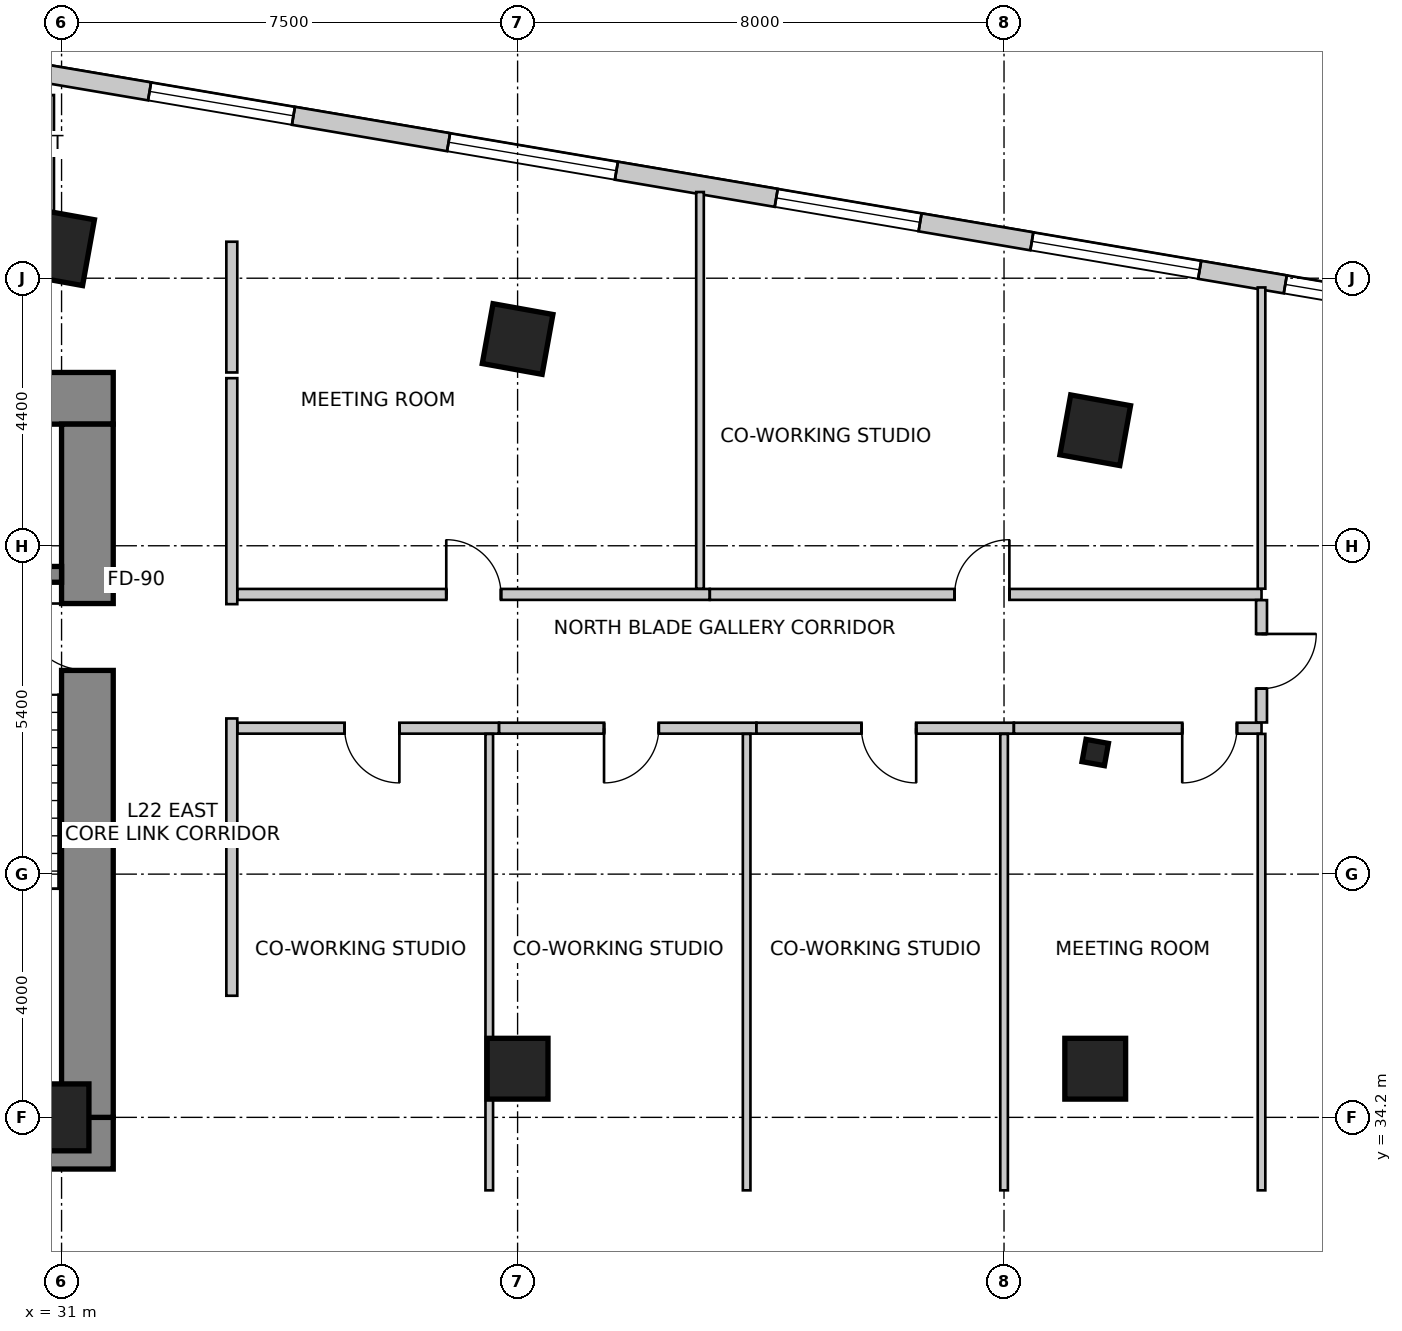
"""IFC4 building model, lengths in metres.
Left out: names, types, materials, properties, quantities, classifications, styles, units other than length and angle.
Written with IfcOpenShell. Run it as: python <this file> out.ifc"""

import sys

from ifc_helpers import new_model, si_unit, direction, frame, frame_2d, origin, origin_2d, place, context, subcontext, project, spatial, rectangle, i_section, extrude, source, transform, mapped, element, fill, save


model = new_model("IFC4")
c1 = context("Model", 3, precision=1e-05, world=origin(), true_north=direction((0.0, 1.0)))
c2 = subcontext(c1, "Body", "Model", "MODEL_VIEW")
j1 = project(units=[si_unit("LENGTHUNIT", "METRE"), si_unit("PLANEANGLEUNIT", "RADIAN")], contexts=[c1])
p1 = place(None, origin())
s1 = spatial("IfcSite", under=j1, at=p1, CompositionType="ELEMENT")
p2 = place(p1, origin())
s2 = spatial("IfcBuilding", under=s1, at=p2, CompositionType="ELEMENT")
p3 = place(p2, frame((0.0, 0.0, 91.0)))
s3 = spatial("IfcBuildingStorey", under=s2, at=p3, CompositionType="ELEMENT", Elevation=91.0)
p4 = place(p3, frame((15.75, 46.025, 0.0), z_axis=(0.0, 0.0, 1.0), x_axis=(1.0, 0.0, 0.0)))
e1 = element("IfcWall", 1, at=p4, inside=s3, PredefinedType="SHEAR", context=c2, shape_type="SweptSolid", body=[
    extrude(rectangle(XDim=16.1, YDim=0.85, at=frame_2d((8.05, 0.0))), origin(), (0.0, 0.0, 1.0), 4.0),
])
p5 = place(p3, frame((15.75, 33.775, 0.0), z_axis=(0.0, 0.0, 1.0), x_axis=(1.0, 0.0, 0.0)))
e2 = element("IfcWall", 2, at=p5, inside=s3, PredefinedType="SHEAR", context=c2, shape_type="SweptSolid", body=[
    extrude(rectangle(XDim=16.1, YDim=0.85, at=frame_2d((8.05, 0.0))), origin(), (0.0, 0.0, 1.0), 4.0),
])
m1 = source(origin(), c2, "Body", "SweptSolid", [
    extrude(rectangle(XDim=1.3, YDim=2.15, at=frame_2d((0.65, 1.075))), frame((0.0, 0.435, 0.0), z_axis=(0.0, -1.0, 0.0), x_axis=(1.0, 0.0, 0.0)), (0.0, 0.0, 1.0), 0.87),
])
p6 = place(p5, frame((10.18, 0.0, 0.0)))
e3 = element("IfcOpeningElement", 3, at=p6, cuts=e2, PredefinedType="OPENING", context=c2, shape_type="MappedRepresentation", body=[
    mapped(m1, transform((0.0, 0.0, 0.0), scale=1.0)),
])
p7 = place(p3, frame((31.425, 34.2, 0.0), z_axis=(0.0, 0.0, 1.0), x_axis=(0.0, 1.0, 0.0)))
e4 = element("IfcWall", 4, at=p7, inside=s3, PredefinedType="SHEAR", context=c2, shape_type="SweptSolid", body=[
    extrude(rectangle(XDim=11.4, YDim=0.85, at=frame_2d((5.7, 0.0))), origin(), (0.0, 0.0, 1.0), 4.0),
])
m2 = source(origin(), c2, "Body", "SweptSolid", [
    extrude(rectangle(XDim=1.1, YDim=2.15, at=frame_2d((0.55, 1.075))), frame((0.0, 0.435, 0.0), z_axis=(0.0, -1.0, 0.0), x_axis=(1.0, 0.0, 0.0)), (0.0, 0.0, 1.0), 0.87),
])
p8 = place(p7, frame((7.35, 0.0, 0.0)))
e5 = element("IfcOpeningElement", 5, at=p8, cuts=e4, PredefinedType="OPENING", context=c2, shape_type="MappedRepresentation", body=[
    mapped(m2, transform((0.0, 0.0, 0.0), scale=1.0)),
])
p9 = place(p3, frame((27.5, 43.13, 0.0), z_axis=(0.0, 0.0, 1.0), x_axis=(1.0, 0.0, 0.0)))
e6 = element("IfcWall", 6, at=p9, inside=s3, PredefinedType="SHEAR", context=c2, shape_type="SweptSolid", body=[
    extrude(rectangle(XDim=3.5, YDim=0.26, at=frame_2d((1.75, 0.0))), origin(), (0.0, 0.0, 1.0), 4.0),
])
m3 = source(origin(), c2, "Body", "SweptSolid", [
    extrude(rectangle(XDim=0.9, YDim=1.1, at=origin_2d()), origin(), (0.0, 0.0, 1.0), 4.0),
])
p10 = place(p3, frame((31.0, 48.5, 0.0), z_axis=(0.0, 0.0, 1.0), x_axis=(0.984195607969, -0.17708474032, 0.0)))
e7 = element("IfcColumn", 7, at=p10, inside=s3, PredefinedType="COLUMN", context=c2, shape_type="MappedRepresentation", body=[
    mapped(m3, transform((0.0, 0.0, 0.0), scale=1.0)),
])
m4 = source(origin(), c2, "Body", "SweptSolid", [
    extrude(rectangle(XDim=1.0, YDim=1.0, at=origin_2d()), origin(), (0.0, 0.0, 1.0), 4.0),
])
for number, where, z_axis, x_axis in (
    (8, (38.5, 47.0, 0.0), (0.0, 0.0, 1.0), (0.984, -0.177, 0.0)),
    (9, (48.0, 45.5, 0.0), (0.0, 0.0, 1.0), (0.984, -0.177, 0.0)),
):
    element("IfcColumn", number, at=place(p3, frame(where, z_axis=z_axis, x_axis=x_axis)), inside=s3, PredefinedType="COLUMN", context=c2, shape_type="MappedRepresentation", body=[
        mapped(m4, transform((0.0, 0.0, 0.0), scale=1.0)),
    ])
p11 = place(p3, frame((31.0, 34.2, 0.0), z_axis=(0.0, 0.0, 1.0), x_axis=(1.0, 0.0, 0.0)))
e10 = element("IfcColumn", 10, at=p11, inside=s3, PredefinedType="COLUMN", context=c2, shape_type="MappedRepresentation", body=[
    mapped(m3, transform((0.0, 0.0, 0.0), scale=1.0)),
])
for number, where, z_axis, x_axis in (
    (11, (38.5, 35.0, 0.0), (0.0, 0.0, 1.0), (1.0, 0.0, 0.0)),
    (12, (48.0, 35.0, 0.0), (0.0, 0.0, 1.0), (1.0, 0.0, 0.0)),
):
    element("IfcColumn", number, at=place(p3, frame(where, z_axis=z_axis, x_axis=x_axis)), inside=s3, PredefinedType="COLUMN", context=c2, shape_type="MappedRepresentation", body=[
        mapped(m4, transform((0.0, 0.0, 0.0), scale=1.0)),
    ])
m5 = source(origin(), c2, "Body", "SweptSolid", [
    extrude(i_section(OverallWidth=0.374, OverallDepth=0.372, WebThickness=0.016, FlangeThickness=0.026, FilletRadius=0.015, at=origin_2d()), origin(), (0.0, 0.0, 1.0), 4.0),
])
p12 = place(p3, frame((48.0, 40.2, 0.0), z_axis=(0.0, 0.0, 1.0), x_axis=(0.984195607969, -0.17708474032, 0.0)))
e13 = element("IfcColumn", 13, at=p12, inside=s3, PredefinedType="COLUMN", context=c2, shape_type="MappedRepresentation", body=[
    mapped(m5, transform((0.0, 0.0, 0.0), scale=1.0)),
])
p13 = place(p3, frame((53.961, 47.417, 0.0), z_axis=(0.0, 0.0, 1.0), x_axis=(-0.985865713455, 0.167537443678, 0.0)))
e14 = element("IfcWall", 14, at=p13, inside=s3, PredefinedType="SOLIDWALL", context=c2, shape_type="SweptSolid", body=[
    extrude(rectangle(XDim=32.537, YDim=0.3, at=frame_2d((16.269, 0.0))), origin(), (0.0, 0.0, 1.0), 3.75),
])
m6 = source(origin(), c2, "Body", "SweptSolid", [
    extrude(rectangle(XDim=2.4, YDim=2.2, at=frame_2d((1.2, 1.1))), frame((0.0, 0.16, 0.0), z_axis=(0.0, -1.0, 0.0), x_axis=(1.0, 0.0, 0.0)), (0.0, 0.0, 1.0), 0.32),
])
p14 = place(p13, frame((0.476, 0.0, 0.85)))
e15 = element("IfcOpeningElement", 15, at=p14, cuts=e14, PredefinedType="OPENING", context=c2, shape_type="MappedRepresentation", body=[
    mapped(m6, transform((0.0, 0.0, 0.0), scale=1.0)),
])
m7 = source(origin(), c2, "Body", "SweptSolid", [
    extrude(rectangle(XDim=2.8, YDim=2.4, at=frame_2d((1.4, 1.2))), frame((0.0, 0.16, 0.0), z_axis=(0.0, -1.0, 0.0), x_axis=(1.0, 0.0, 0.0)), (0.0, 0.0, 1.0), 0.32),
])
p15 = place(p13, frame((4.304, 0.0, 0.85)))
e16 = element("IfcOpeningElement", 16, at=p15, cuts=e14, PredefinedType="OPENING", context=c2, shape_type="MappedRepresentation", body=[
    mapped(m7, transform((0.0, 0.0, 0.0), scale=1.0)),
])
p16 = place(p13, frame((8.968, 0.0, 0.85)))
e17 = element("IfcOpeningElement", 17, at=p16, cuts=e14, PredefinedType="OPENING", context=c2, shape_type="MappedRepresentation", body=[
    mapped(m6, transform((0.0, 0.0, 0.0), scale=1.0)),
])
p17 = place(p13, frame((14.034, 0.0, 0.85)))
e18 = element("IfcOpeningElement", 18, at=p17, cuts=e14, PredefinedType="OPENING", context=c2, shape_type="MappedRepresentation", body=[
    mapped(m7, transform((0.0, 0.0, 0.0), scale=1.0)),
])
p18 = place(p13, frame((19.422, 0.0, 0.85)))
e19 = element("IfcOpeningElement", 19, at=p18, cuts=e14, PredefinedType="OPENING", context=c2, shape_type="MappedRepresentation", body=[
    mapped(m6, transform((0.0, 0.0, 0.0), scale=1.0)),
])
p19 = place(p13, frame((24.895, 0.0, 0.85)))
e20 = element("IfcOpeningElement", 20, at=p19, cuts=e14, PredefinedType="OPENING", context=c2, shape_type="MappedRepresentation", body=[
    mapped(m7, transform((0.0, 0.0, 0.0), scale=1.0)),
])
p20 = place(p13, frame((29.395, 0.0, 0.85)))
e21 = element("IfcOpeningElement", 21, at=p20, cuts=e14, PredefinedType="OPENING", context=c2, shape_type="MappedRepresentation", body=[
    mapped(m7, transform((0.0, 0.0, 0.0), scale=1.0)),
])
p21 = place(p3, frame((25.362, 48.6, 0.0), z_axis=(0.0, 0.0, 1.0), x_axis=(1.0, 0.0, 0.0)))
e22 = element("IfcWall", 22, at=p21, inside=s3, PredefinedType="PARTITIONING", context=c2, shape_type="SweptSolid", body=[
    extrude(rectangle(XDim=5.598, YDim=0.18, at=frame_2d((2.799, 0.0))), origin(), (0.0, 0.0, 1.0), 2.892),
])
m8 = source(origin(), c2, "Body", "SweptSolid", [
    extrude(rectangle(XDim=0.9, YDim=2.15, at=frame_2d((0.45, 1.075))), frame((0.0, 0.1, 0.0), z_axis=(0.0, -1.0, 0.0), x_axis=(1.0, 0.0, 0.0)), (0.0, 0.0, 1.0), 0.2),
])
p22 = place(p21, frame((2.349, 0.0, 0.0)))
e23 = element("IfcOpeningElement", 23, at=p22, cuts=e22, PredefinedType="OPENING", context=c2, shape_type="MappedRepresentation", body=[
    mapped(m8, transform((0.0, 0.0, 0.0), scale=1.0)),
])
p23 = place(p3, frame((33.8, 48.6, 0.0), z_axis=(0.0, 0.0, 1.0), x_axis=(0.0, -1.0, 0.0)))
e24 = element("IfcWall", 24, at=p23, inside=s3, PredefinedType="PARTITIONING", context=c2, shape_type="SweptSolid", body=[
    extrude(rectangle(XDim=2.15, YDim=0.18, at=frame_2d((1.075, 0.0))), origin(), (0.0, 0.0, 1.0), 2.892),
])
p24 = place(p3, frame((33.8, 40.76, 0.0), z_axis=(0.0, 0.0, 1.0), x_axis=(0.0, -1.0, 0.0)))
e25 = element("IfcWall", 25, at=p24, inside=s3, PredefinedType="PARTITIONING", context=c2, shape_type="SweptSolid", body=[
    extrude(rectangle(XDim=4.56, YDim=0.18, at=frame_2d((2.28, 0.0))), origin(), (0.0, 0.0, 1.0), 3.75),
])
p25 = place(p3, frame((33.8, 46.356, 0.0), z_axis=(0.0, 0.0, 1.0), x_axis=(0.0, -1.0, 0.0)))
e26 = element("IfcWall", 26, at=p25, inside=s3, PredefinedType="PARTITIONING", context=c2, shape_type="SweptSolid", body=[
    extrude(rectangle(XDim=3.716, YDim=0.18, at=frame_2d((1.858, 0.0))), origin(), (0.0, 0.0, 1.0), 3.279),
])
p26 = place(p3, frame((38.194, 40.6, 0.0), z_axis=(0.0, 0.0, 1.0), x_axis=(-1.0, 0.0, 0.0)))
e27 = element("IfcWall", 27, at=p26, inside=s3, PredefinedType="PARTITIONING", context=c2, shape_type="SweptSolid", body=[
    extrude(rectangle(XDim=4.3, YDim=0.18, at=frame_2d((2.15, 0.0))), origin(), (0.0, 0.0, 1.0), 3.419),
])
p27 = place(p26, frame((1.638, 0.0, 0.0)))
e28 = element("IfcOpeningElement", 28, at=p27, cuts=e27, PredefinedType="OPENING", context=c2, shape_type="MappedRepresentation", body=[
    mapped(m8, transform((0.0, 0.0, 0.0), scale=1.0)),
])
p28 = place(p3, frame((42.427, 40.6, 0.0), z_axis=(0.0, 0.0, 1.0), x_axis=(-1.0, 0.0, 0.0)))
e29 = element("IfcWall", 29, at=p28, inside=s3, PredefinedType="PARTITIONING", context=c2, shape_type="SweptSolid", body=[
    extrude(rectangle(XDim=4.231, YDim=0.18, at=frame_2d((2.115, 0.0))), origin(), (0.0, 0.0, 1.0), 3.125),
])
p29 = place(p28, frame((1.605, 0.0, 0.0)))
e30 = element("IfcOpeningElement", 30, at=p29, cuts=e29, PredefinedType="OPENING", context=c2, shape_type="MappedRepresentation", body=[
    mapped(m8, transform((0.0, 0.0, 0.0), scale=1.0)),
])
p30 = place(p3, frame((46.661, 40.6, 0.0), z_axis=(0.0, 0.0, 1.0), x_axis=(-1.0, 0.0, 0.0)))
e31 = element("IfcWall", 31, at=p30, inside=s3, PredefinedType="PARTITIONING", context=c2, shape_type="SweptSolid", body=[
    extrude(rectangle(XDim=4.232, YDim=0.18, at=frame_2d((2.116, 0.0))), origin(), (0.0, 0.0, 1.0), 3.279),
])
p31 = place(p30, frame((1.606, 0.0, 0.0)))
e32 = element("IfcOpeningElement", 32, at=p31, cuts=e31, PredefinedType="OPENING", context=c2, shape_type="MappedRepresentation", body=[
    mapped(m8, transform((0.0, 0.0, 0.0), scale=1.0)),
])
p32 = place(p3, frame((50.735, 40.6, 0.0), z_axis=(0.0, 0.0, 1.0), x_axis=(-1.0, 0.0, 0.0)))
e33 = element("IfcWall", 33, at=p32, inside=s3, PredefinedType="PARTITIONING", context=c2, shape_type="SweptSolid", body=[
    extrude(rectangle(XDim=4.072, YDim=0.18, at=frame_2d((2.036, 0.0))), origin(), (0.0, 0.0, 1.0), 3.125),
])
p33 = place(p32, frame((0.404, 0.0, 0.0)))
e34 = element("IfcOpeningElement", 34, at=p33, cuts=e33, PredefinedType="OPENING", context=c2, shape_type="MappedRepresentation", body=[
    mapped(m8, transform((0.0, 0.0, 0.0), scale=1.0)),
])
p34 = place(p3, frame((33.894, 42.8, 0.0), z_axis=(0.0, 0.0, 1.0), x_axis=(1.0, 0.0, 0.0)))
e35 = element("IfcWall", 35, at=p34, inside=s3, PredefinedType="PARTITIONING", context=c2, shape_type="SweptSolid", body=[
    extrude(rectangle(XDim=7.766, YDim=0.18, at=frame_2d((3.883, 0.0))), origin(), (0.0, 0.0, 1.0), 3.125),
])
p35 = place(p34, frame((3.433, 0.0, 0.0)))
e36 = element("IfcOpeningElement", 36, at=p35, cuts=e35, PredefinedType="OPENING", context=c2, shape_type="MappedRepresentation", body=[
    mapped(m8, transform((0.0, 0.0, 0.0), scale=1.0)),
])
p36 = place(p3, frame((41.662, 42.8, 0.0), z_axis=(0.0, 0.0, 1.0), x_axis=(1.0, 0.0, 0.0)))
e37 = element("IfcWall", 37, at=p36, inside=s3, PredefinedType="PARTITIONING", context=c2, shape_type="SweptSolid", body=[
    extrude(rectangle(XDim=9.073, YDim=0.18, at=frame_2d((4.537, 0.0))), origin(), (0.0, 0.0, 1.0), 3.125),
])
p37 = place(p36, frame((4.026, 0.0, 0.0)))
e38 = element("IfcOpeningElement", 38, at=p37, cuts=e37, PredefinedType="OPENING", context=c2, shape_type="MappedRepresentation", body=[
    mapped(m8, transform((0.0, 0.0, 0.0), scale=1.0)),
])
p38 = place(p3, frame((50.735, 42.706, 0.0), z_axis=(0.0, 0.0, 1.0), x_axis=(0.0, -1.0, 0.0)))
e39 = element("IfcWall", 39, at=p38, inside=s3, PredefinedType="PARTITIONING", context=c2, shape_type="SweptSolid", body=[
    extrude(rectangle(XDim=2.012, YDim=0.18, at=frame_2d((1.006, 0.0))), origin(), (0.0, 0.0, 1.0), 3.75),
])
p39 = place(p38, frame((0.556, 0.0, 0.0)))
e40 = element("IfcOpeningElement", 40, at=p39, cuts=e39, PredefinedType="OPENING", context=c2, shape_type="MappedRepresentation", body=[
    mapped(m8, transform((0.0, 0.0, 0.0), scale=1.0)),
])
p40 = place(p3, frame((38.034, 40.506, 0.0), z_axis=(0.0, 0.0, 1.0), x_axis=(0.0, -1.0, 0.0)))
e41 = element("IfcWall", 41, at=p40, inside=s3, PredefinedType="PARTITIONING", context=c2, shape_type="SweptSolid", body=[
    extrude(rectangle(XDim=7.506, YDim=0.125, at=frame_2d((3.753, 0.0))), origin(), (0.0, 0.0, 1.0), 3.419),
])
for number, where, z_axis, x_axis in (
    (42, (42.267, 40.506, 0.0), (0.0, 0.0, 1.0), (0.0, -1.0, 0.0)),
    (43, (46.501, 40.506, 0.0), (0.0, 0.0, 1.0), (0.0, -1.0, 0.0)),
):
    element("IfcWall", number, at=place(p3, frame(where, z_axis=z_axis, x_axis=x_axis)), inside=s3, PredefinedType="PARTITIONING", context=c2, shape_type="SweptSolid", body=[
        extrude(rectangle(XDim=7.506, YDim=0.125, at=frame_2d((3.753, 0.0))), origin(), (0.0, 0.0, 1.0), 2.892),
    ])
p41 = place(p3, frame((50.735, 40.506, 0.0), z_axis=(0.0, 0.0, 1.0), x_axis=(0.0, -1.0, 0.0)))
e44 = element("IfcWall", 44, at=p41, inside=s3, PredefinedType="PARTITIONING", context=c2, shape_type="SweptSolid", body=[
    extrude(rectangle(XDim=7.506, YDim=0.125, at=frame_2d((3.753, 0.0))), origin(), (0.0, 0.0, 1.0), 3.75),
])
p42 = place(p3, frame((41.5, 49.417, 0.0), z_axis=(0.0, 0.0, 1.0), x_axis=(0.0, -1.0, 0.0)))
e45 = element("IfcWall", 45, at=p42, inside=s3, PredefinedType="PARTITIONING", context=c2, shape_type="SweptSolid", body=[
    extrude(rectangle(XDim=6.523, YDim=0.125, at=frame_2d((3.262, 0.0))), origin(), (0.0, 0.0, 1.0), 2.892),
])
p43 = place(p3, frame((50.735, 47.848, 0.0), z_axis=(0.0, 0.0, 1.0), x_axis=(0.0, -1.0, 0.0)))
e46 = element("IfcWall", 46, at=p43, inside=s3, PredefinedType="PARTITIONING", context=c2, shape_type="SweptSolid", body=[
    extrude(rectangle(XDim=4.954, YDim=0.125, at=frame_2d((2.477, 0.0))), origin(), (0.0, 0.0, 1.0), 3.75),
])
p44 = place(p3, frame((30.8, 51.013, 0.0), z_axis=(0.0, 0.0, 1.0), x_axis=(0.0, -1.0, 0.0)))
e47 = element("IfcWall", 47, at=p44, inside=s3, PredefinedType="PARTITIONING", context=c2, shape_type="SweptSolid", body=[
    extrude(rectangle(XDim=2.193, YDim=0.15, at=frame_2d((1.096, 0.0))), origin(), (0.0, 0.0, 1.0), 3.75),
])
m9 = source(origin(), c2, "Body", "SweptSolid", [
    extrude(rectangle(XDim=2.4, YDim=2.2, at=frame_2d((1.2, 1.1))), frame((0.0, -0.015, 0.0), z_axis=(0.0, -1.0, 0.0), x_axis=(1.0, 0.0, 0.0)), (0.0, 0.0, 1.0), 0.06),
])
p45 = place(p14, origin())
e48 = element("IfcWindow", 48, at=p45, inside=s3, PartitioningType="SINGLE_PANEL", PredefinedType="WINDOW", context=c2, shape_type="MappedRepresentation", body=[
    mapped(m9, transform((0.0, 0.0, 0.0), scale=1.0)),
])
fill(e15, e48)
m10 = source(origin(), c2, "Body", "SweptSolid", [
    extrude(rectangle(XDim=2.8, YDim=2.4, at=frame_2d((1.4, 1.2))), frame((0.0, -0.015, 0.0), z_axis=(0.0, -1.0, 0.0), x_axis=(1.0, 0.0, 0.0)), (0.0, 0.0, 1.0), 0.06),
])
p46 = place(p15, origin())
e49 = element("IfcWindow", 49, at=p46, inside=s3, PartitioningType="SINGLE_PANEL", PredefinedType="WINDOW", context=c2, shape_type="MappedRepresentation", body=[
    mapped(m10, transform((0.0, 0.0, 0.0), scale=1.0)),
])
fill(e16, e49)
p47 = place(p16, origin())
e50 = element("IfcWindow", 50, at=p47, inside=s3, PartitioningType="SINGLE_PANEL", PredefinedType="WINDOW", context=c2, shape_type="MappedRepresentation", body=[
    mapped(m9, transform((0.0, 0.0, 0.0), scale=1.0)),
])
fill(e17, e50)
p48 = place(p17, origin())
e51 = element("IfcWindow", 51, at=p48, inside=s3, PartitioningType="SINGLE_PANEL", PredefinedType="WINDOW", context=c2, shape_type="MappedRepresentation", body=[
    mapped(m10, transform((0.0, 0.0, 0.0), scale=1.0)),
])
fill(e18, e51)
p49 = place(p18, origin())
e52 = element("IfcWindow", 52, at=p49, inside=s3, PartitioningType="SINGLE_PANEL", PredefinedType="WINDOW", context=c2, shape_type="MappedRepresentation", body=[
    mapped(m9, transform((0.0, 0.0, 0.0), scale=1.0)),
])
fill(e19, e52)
m11 = source(origin(), c2, "Body", "SweptSolid", [
    extrude(rectangle(XDim=1.1, YDim=2.15, at=frame_2d((0.55, 1.075))), frame((0.0, 0.025, 0.0), z_axis=(0.0, -1.0, 0.0), x_axis=(1.0, 0.0, 0.0)), (0.0, 0.0, 1.0), 0.05),
])
p50 = place(p8, origin())
e53 = element("IfcDoor", 53, at=p50, inside=s3, OperationType="SINGLE_SWING_RIGHT", PredefinedType="DOOR", context=c2, shape_type="MappedRepresentation", body=[
    mapped(m11, transform((0.0, 0.0, 0.0), scale=1.0)),
])
fill(e5, e53)
m12 = source(origin(), c2, "Body", "SweptSolid", [
    extrude(rectangle(XDim=0.9, YDim=2.15, at=frame_2d((0.45, 1.075))), frame((0.0, 0.025, 0.0), z_axis=(0.0, -1.0, 0.0), x_axis=(1.0, 0.0, 0.0)), (0.0, 0.0, 1.0), 0.05),
])
p51 = place(p27, origin())
e54 = element("IfcDoor", 54, at=p51, inside=s3, OperationType="SINGLE_SWING_LEFT", PredefinedType="DOOR", context=c2, shape_type="MappedRepresentation", body=[
    mapped(m12, transform((0.0, 0.0, 0.0), scale=1.0)),
])
fill(e28, e54)
p52 = place(p29, origin())
e55 = element("IfcDoor", 55, at=p52, inside=s3, OperationType="SINGLE_SWING_RIGHT", PredefinedType="DOOR", context=c2, shape_type="MappedRepresentation", body=[
    mapped(m12, transform((0.0, 0.0, 0.0), scale=1.0)),
])
fill(e30, e55)
p53 = place(p31, origin())
e56 = element("IfcDoor", 56, at=p53, inside=s3, OperationType="SINGLE_SWING_LEFT", PredefinedType="DOOR", context=c2, shape_type="MappedRepresentation", body=[
    mapped(m12, transform((0.0, 0.0, 0.0), scale=1.0)),
])
fill(e32, e56)
p54 = place(p33, origin())
e57 = element("IfcDoor", 57, at=p54, inside=s3, OperationType="SINGLE_SWING_RIGHT", PredefinedType="DOOR", context=c2, shape_type="MappedRepresentation", body=[
    mapped(m12, transform((0.0, 0.0, 0.0), scale=1.0)),
])
fill(e34, e57)
p55 = place(p35, origin())
e58 = element("IfcDoor", 58, at=p55, inside=s3, OperationType="SINGLE_SWING_LEFT", PredefinedType="DOOR", context=c2, shape_type="MappedRepresentation", body=[
    mapped(m12, transform((0.0, 0.0, 0.0), scale=1.0)),
])
fill(e36, e58)
p56 = place(p37, origin())
e59 = element("IfcDoor", 59, at=p56, inside=s3, OperationType="SINGLE_SWING_RIGHT", PredefinedType="DOOR", context=c2, shape_type="MappedRepresentation", body=[
    mapped(m12, transform((0.0, 0.0, 0.0), scale=1.0)),
])
fill(e38, e59)
p57 = place(p39, origin())
e60 = element("IfcDoor", 60, at=p57, inside=s3, OperationType="SINGLE_SWING_LEFT", PredefinedType="DOOR", context=c2, shape_type="MappedRepresentation", body=[
    mapped(m12, transform((0.0, 0.0, 0.0), scale=1.0)),
])
fill(e40, e60)
save(model, sys.argv[1])
